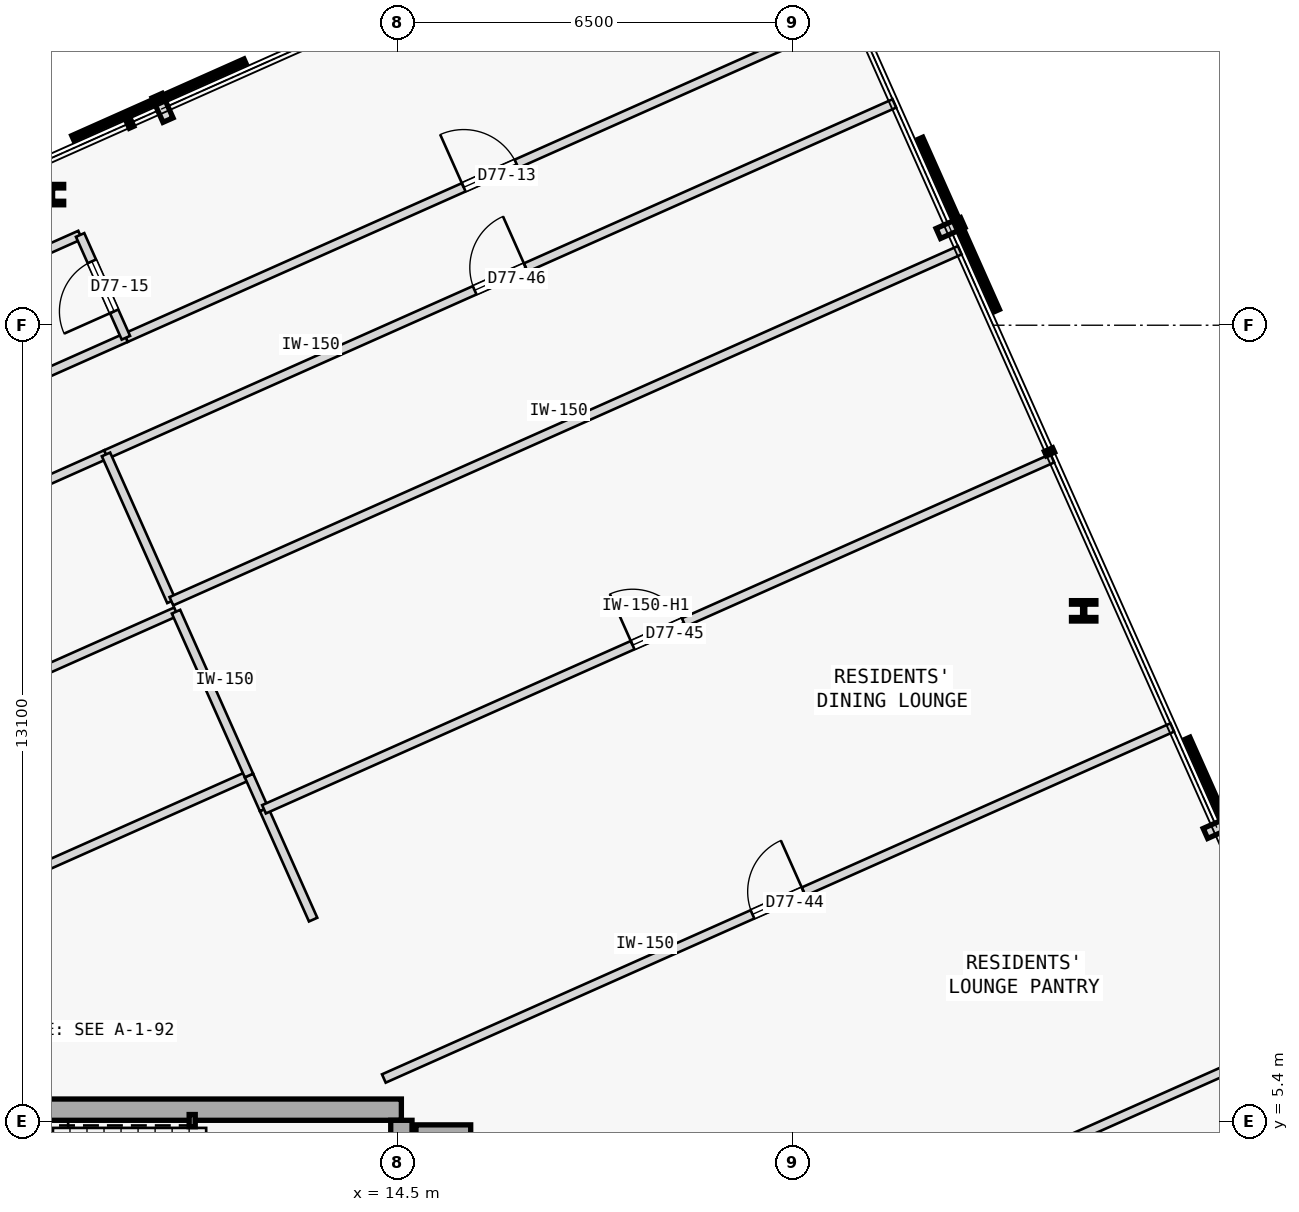
"""IFC4 building model, lengths in metres.
Left out: names, types, materials, properties, quantities, classifications, styles, units other than length and angle.
Written with IfcOpenShell. Run it as: python <this file> out.ifc"""

import sys

from ifc_helpers import new_model, si_unit, direction, frame, frame_2d, origin, origin_2d, place, context, subcontext, project, spatial, rectangle, hollow_rectangle, i_section, extrude, element, fill, save


model = new_model("IFC4")
c1 = context("Model", 3, precision=1e-05, world=origin(), true_north=direction((0.0, 1.0)))
c2 = subcontext(c1, "Body", "Model", "MODEL_VIEW")
j1 = project(units=[si_unit("LENGTHUNIT", "METRE"), si_unit("PLANEANGLEUNIT", "RADIAN")], contexts=[c1])
p1 = place(None, origin())
s1 = spatial("IfcSite", under=j1, at=p1, CompositionType="ELEMENT")
p2 = place(p1, origin())
s2 = spatial("IfcBuilding", under=s1, at=p2, CompositionType="ELEMENT")
p3 = place(p2, frame((0.0, 0.0, 288.6)))
s3 = spatial("IfcBuildingStorey", under=s2, at=p3, CompositionType="ELEMENT", Elevation=288.6)
p4 = place(p3, frame((15.25, 4.9, 0.0), z_axis=(0.0, 0.0, 1.0), x_axis=(1.0, 0.0, 0.0)))
e1 = element("IfcColumn", 1, at=p4, inside=s3, PredefinedType="COLUMN", context=c2, shape_type="SweptSolid", body=[
    extrude(rectangle(XDim=0.9, YDim=0.9, at=origin_2d()), origin(), (0.0, 0.0, 1.0), 3.35),
])
p5 = place(p3, frame((3.15, 5.6, 0.0), z_axis=(0.0, 0.0, 1.0), x_axis=(1.0, 0.0, 0.0)))
e2 = element("IfcWall", 2, at=p5, inside=s3, PredefinedType="SHEAR", context=c2, shape_type="SweptSolid", body=[
    extrude(rectangle(XDim=11.41, YDim=0.35, at=frame_2d((5.705, 0.0))), origin(), (0.0, 0.0, 1.0), 3.125),
])
p6 = place(p3, frame((14.56, -5.425, 0.0), z_axis=(0.0, 0.0, 1.0), x_axis=(0.0, 1.0, 0.0)))
e3 = element("IfcWall", 3, at=p6, inside=s3, PredefinedType="SHEAR", context=c2, shape_type="SweptSolid", body=[
    extrude(rectangle(XDim=10.85, YDim=0.35, at=frame_2d((5.425, 0.0))), origin(), (0.0, 0.0, 1.0), 3.125),
])
p7 = place(p3, frame((11.12, 5.42, 0.0), z_axis=(0.0, 0.0, 1.0), x_axis=(1.0, 0.0, 0.0)))
e4 = element("IfcColumn", 4, at=p7, inside=s3, PredefinedType="COLUMN", context=c2, shape_type="SweptSolid", body=[
    extrude(hollow_rectangle(XDim=0.1, YDim=0.2, WallThickness=0.008, at=origin_2d()), origin(), (0.0, 0.0, 1.0), 3.35),
])
for number, where, z_axis, x_axis in (
    (5, (25.781, 13.803, 0.0), (0.0, 0.0, 1.0), (1.0, 0.0, 0.0)),
    (6, (8.806, 20.648, 0.0), (0.0, 0.0, 1.0), (1.0, 0.0, 0.0)),
):
    element("IfcColumn", number, at=place(p3, frame(where, z_axis=z_axis, x_axis=x_axis)), inside=s3, PredefinedType="COLUMN", context=c2, shape_type="SweptSolid", body=[
        extrude(i_section(OverallWidth=0.401, OverallDepth=0.335, WebThickness=0.036, FlangeThickness=0.058, FilletRadius=0.015, at=origin_2d()), origin(), (0.0, 0.0, 1.0), 3.35),
    ])
p8 = place(p3, frame((10.03, 18.294, 0.0), z_axis=(0.0, 0.0, 1.0), x_axis=(0.913545706015, 0.406736085222, 0.0)))
e7 = element("IfcWall", 7, at=p8, inside=s3, PredefinedType="PARTITIONING", context=c2, shape_type="SweptSolid", body=[
    extrude(rectangle(XDim=13.113, YDim=0.15, at=frame_2d((6.557, 0.0))), origin(), (0.0, 0.0, 1.0), 3.125),
])
p9 = place(p8, frame((6.082, 0.0, 0.0)))
e8 = element("IfcOpeningElement", 8, at=p9, cuts=e7, PredefinedType="OPENING", context=c2, shape_type="SweptSolid", body=[
    extrude(rectangle(XDim=0.95, YDim=2.15, at=frame_2d((0.475, 1.075))), frame((0.0, 0.085, 0.0), z_axis=(0.0, -1.0, 0.0), x_axis=(1.0, 0.0, 0.0)), (0.0, 0.0, 1.0), 0.17),
])
p10 = place(p3, frame((6.055, 16.525, 0.0), z_axis=(0.0, 0.0, 1.0), x_axis=(0.913554477336, 0.406716383908, 0.0)))
e9 = element("IfcWall", 9, at=p10, inside=s3, PredefinedType="PARTITIONING", context=c2, shape_type="SweptSolid", body=[
    extrude(rectangle(XDim=4.35, YDim=0.15, at=frame_2d((2.175, 0.0))), origin(), (0.0, 0.0, 1.0), 3.125),
])
p11 = place(p3, frame((3.7, 13.703, 0.0), z_axis=(0.0, 0.0, 1.0), x_axis=(0.913549363376, 0.406727870542, 0.0)))
e10 = element("IfcWall", 10, at=p11, inside=s3, PredefinedType="PARTITIONING", context=c2, shape_type="SweptSolid", body=[
    extrude(rectangle(XDim=6.571, YDim=0.15, at=frame_2d((3.286, 0.0))), origin(), (0.0, 0.0, 1.0), 3.125),
])
p12 = place(p11, frame((2.825, 0.0, 0.0)))
e11 = element("IfcOpeningElement", 11, at=p12, cuts=e10, PredefinedType="OPENING", context=c2, shape_type="SweptSolid", body=[
    extrude(rectangle(XDim=0.92, YDim=2.15, at=frame_2d((0.46, 1.075))), frame((0.0, 0.085, 0.0), z_axis=(0.0, -1.0, 0.0), x_axis=(1.0, 0.0, 0.0)), (0.0, 0.0, 1.0), 0.17),
])
p13 = place(p3, frame((9.703, 16.375, 0.0), z_axis=(0.0, 0.0, 1.0), x_axis=(0.913544622417, 0.406738519018, 0.0)))
e12 = element("IfcWall", 12, at=p13, inside=s3, PredefinedType="PARTITIONING", context=c2, shape_type="SweptSolid", body=[
    extrude(rectangle(XDim=14.192, YDim=0.15, at=frame_2d((7.096, 0.0))), origin(), (0.0, 0.0, 1.0), 3.125),
])
p14 = place(p13, frame((6.636, 0.0, 0.0)))
e13 = element("IfcOpeningElement", 13, at=p14, cuts=e12, PredefinedType="OPENING", context=c2, shape_type="SweptSolid", body=[
    extrude(rectangle(XDim=0.92, YDim=2.15, at=frame_2d((0.46, 1.075))), frame((0.0, 0.085, 0.0), z_axis=(0.0, -1.0, 0.0), x_axis=(1.0, 0.0, 0.0)), (0.0, 0.0, 1.0), 0.17),
])
p15 = place(p3, frame((5.303, 18.215, 0.0), z_axis=(0.0, 0.0, 1.0), x_axis=(0.913554477336, 0.406716383908, 0.0)))
e14 = element("IfcWall", 14, at=p15, inside=s3, PredefinedType="PARTITIONING", context=c2, shape_type="SweptSolid", body=[
    extrude(rectangle(XDim=4.35, YDim=0.15, at=frame_2d((2.175, 0.0))), origin(), (0.0, 0.0, 1.0), 3.125),
])
p16 = place(p3, frame((10.03, 18.294, 0.0), z_axis=(0.0, 0.0, 1.0), x_axis=(-0.406701600856, 0.913561058639, 0.0)))
e15 = element("IfcWall", 15, at=p16, inside=s3, PredefinedType="PARTITIONING", context=c2, shape_type="SweptSolid", body=[
    extrude(rectangle(XDim=1.85, YDim=0.15, at=frame_2d((0.925, 0.0))), origin(), (0.0, 0.0, 1.0), 3.125),
])
p17 = place(p16, frame((0.475, 0.0, 0.0)))
e16 = element("IfcOpeningElement", 16, at=p17, cuts=e15, PredefinedType="OPENING", context=c2, shape_type="SweptSolid", body=[
    extrude(rectangle(XDim=0.9, YDim=2.15, at=frame_2d((0.45, 1.075))), frame((0.0, 0.085, 0.0), z_axis=(0.0, -1.0, 0.0), x_axis=(1.0, 0.0, 0.0)), (0.0, 0.0, 1.0), 0.17),
])
p18 = place(p3, frame((3.7, 7.376, 0.0), z_axis=(0.0, 0.0, 1.0), x_axis=(0.91354490899, 0.406737875367, 0.0)))
e17 = element("IfcWall", 17, at=p18, inside=s3, PredefinedType="PARTITIONING", context=c2, shape_type="SweptSolid", body=[
    extrude(rectangle(XDim=9.144, YDim=0.15, at=frame_2d((4.572, 0.0))), origin(), (0.0, 0.0, 1.0), 3.125),
])
p19 = place(p3, frame((13.109, 8.726, 0.0), z_axis=(0.0, 0.0, 1.0), x_axis=(-0.406788519224, 0.913522359128, 0.0)))
e18 = element("IfcWall", 18, at=p19, inside=s3, PredefinedType="PARTITIONING", context=c2, shape_type="SweptSolid", body=[
    extrude(rectangle(XDim=1.986, YDim=0.15, at=frame_2d((0.993, 0.0))), origin(), (0.0, 0.0, 1.0), 3.125),
])
p20 = place(p3, frame((12.301, 10.54, 0.0), z_axis=(0.0, 0.0, 1.0), x_axis=(-0.406436552015, 0.913679007741, 0.0)))
e19 = element("IfcWall", 19, at=p20, inside=s3, PredefinedType="PARTITIONING", context=c2, shape_type="SweptSolid", body=[
    extrude(rectangle(XDim=0.608, YDim=0.15, at=frame_2d((0.304, 0.0))), origin(), (0.0, 0.0, 1.0), 3.125),
])
p21 = place(p3, frame((3.7, 10.604, 0.0), z_axis=(0.0, 0.0, 1.0), x_axis=(0.913534926439, 0.406760295722, 0.0)))
e20 = element("IfcWall", 20, at=p21, inside=s3, PredefinedType="PARTITIONING", context=c2, shape_type="SweptSolid", body=[
    extrude(rectangle(XDim=7.831, YDim=0.15, at=frame_2d((3.916, 0.0))), origin(), (0.0, 0.0, 1.0), 3.125),
])
p22 = place(p3, frame((12.054, 11.095, 0.0), z_axis=(0.0, 0.0, 1.0), x_axis=(-0.406798922371, 0.91351772657, 0.0)))
e21 = element("IfcWall", 21, at=p22, inside=s3, PredefinedType="PARTITIONING", context=c2, shape_type="SweptSolid", body=[
    extrude(rectangle(XDim=2.949, YDim=0.15, at=frame_2d((1.475, 0.0))), origin(), (0.0, 0.0, 1.0), 3.125),
])
p23 = place(p3, frame((10.778, 13.961, 0.0), z_axis=(0.0, 0.0, 1.0), x_axis=(-0.406712614091, 0.913556155657, 0.0)))
e22 = element("IfcWall", 22, at=p23, inside=s3, PredefinedType="PARTITIONING", context=c2, shape_type="SweptSolid", body=[
    extrude(rectangle(XDim=2.643, YDim=0.15, at=frame_2d((1.322, 0.0))), origin(), (0.0, 0.0, 1.0), 3.125),
])
p24 = place(p3, frame((16.512, 1.082, 0.0), z_axis=(0.0, 0.0, 1.0), x_axis=(0.913544622417, 0.406738519018, 0.0)))
e23 = element("IfcWall", 23, at=p24, inside=s3, PredefinedType="PARTITIONING", context=c2, shape_type="SweptSolid", body=[
    extrude(rectangle(XDim=14.192, YDim=0.15, at=frame_2d((7.096, 0.0))), origin(), (0.0, 0.0, 1.0), 3.125),
])
p25 = place(p24, frame((6.636, 0.0, 0.0)))
e24 = element("IfcOpeningElement", 24, at=p25, cuts=e23, PredefinedType="OPENING", context=c2, shape_type="SweptSolid", body=[
    extrude(rectangle(XDim=0.92, YDim=2.15, at=frame_2d((0.46, 1.075))), frame((0.0, 0.085, 0.0), z_axis=(0.0, -1.0, 0.0), x_axis=(1.0, 0.0, 0.0)), (0.0, 0.0, 1.0), 0.17),
])
p26 = place(p3, frame((14.272, 6.113, 0.0), z_axis=(0.0, 0.0, 1.0), x_axis=(0.913551014388, 0.406724162191, 0.0)))
e25 = element("IfcWall", 25, at=p26, inside=s3, PredefinedType="PARTITIONING", context=c2, shape_type="SweptSolid", body=[
    extrude(rectangle(XDim=14.192, YDim=0.15, at=frame_2d((7.096, 0.0))), origin(), (0.0, 0.0, 1.0), 3.125),
])
p27 = place(p26, frame((6.636, 0.0, 0.0)))
e26 = element("IfcOpeningElement", 26, at=p27, cuts=e25, PredefinedType="OPENING", context=c2, shape_type="SweptSolid", body=[
    extrude(rectangle(XDim=0.92, YDim=2.15, at=frame_2d((0.46, 1.075))), frame((0.0, 0.085, 0.0), z_axis=(0.0, -1.0, 0.0), x_axis=(1.0, 0.0, 0.0)), (0.0, 0.0, 1.0), 0.17),
])
p28 = place(p3, frame((12.301, 10.54, 0.0), z_axis=(0.0, 0.0, 1.0), x_axis=(0.913544622417, 0.406738519018, 0.0)))
e27 = element("IfcWall", 27, at=p28, inside=s3, PredefinedType="PARTITIONING", context=c2, shape_type="SweptSolid", body=[
    extrude(rectangle(XDim=14.192, YDim=0.15, at=frame_2d((7.096, 0.0))), origin(), (0.0, 0.0, 1.0), 2.675),
])
p29 = place(p28, frame((6.636, 0.0, 0.0)))
e28 = element("IfcOpeningElement", 28, at=p29, cuts=e27, PredefinedType="OPENING", context=c2, shape_type="SweptSolid", body=[
    extrude(rectangle(XDim=0.92, YDim=2.15, at=frame_2d((0.46, 1.075))), frame((0.0, 0.085, 0.0), z_axis=(0.0, -1.0, 0.0), x_axis=(1.0, 0.0, 0.0)), (0.0, 0.0, 1.0), 0.17),
])
p30 = place(p3, frame((10.778, 13.961, 0.0), z_axis=(0.0, 0.0, 1.0), x_axis=(0.913544622417, 0.406738519018, 0.0)))
e29 = element("IfcWall", 29, at=p30, inside=s3, PredefinedType="PARTITIONING", context=c2, shape_type="SweptSolid", body=[
    extrude(rectangle(XDim=14.192, YDim=0.15, at=frame_2d((7.096, 0.0))), origin(), (0.0, 0.0, 1.0), 3.125),
])
p31 = place(p9, origin())
e30 = element("IfcDoor", 30, at=p31, inside=s3, OperationType="SINGLE_SWING_LEFT", PredefinedType="DOOR", context=c2, shape_type="SweptSolid", body=[
    extrude(rectangle(XDim=0.95, YDim=2.15, at=frame_2d((0.475, 1.075))), frame((0.0, 0.025, 0.0), z_axis=(0.0, -1.0, 0.0), x_axis=(1.0, 0.0, 0.0)), (0.0, 0.0, 1.0), 0.05),
])
fill(e8, e30)
p32 = place(p17, origin())
e31 = element("IfcDoor", 31, at=p32, inside=s3, OperationType="SINGLE_SWING_LEFT", PredefinedType="DOOR", context=c2, shape_type="SweptSolid", body=[
    extrude(rectangle(XDim=0.9, YDim=2.15, at=frame_2d((0.45, 1.075))), frame((0.0, 0.025, 0.0), z_axis=(0.0, -1.0, 0.0), x_axis=(1.0, 0.0, 0.0)), (0.0, 0.0, 1.0), 0.05),
])
fill(e16, e31)
p33 = place(p27, origin())
e32 = element("IfcDoor", 32, at=p33, inside=s3, OperationType="SINGLE_SWING_RIGHT", PredefinedType="DOOR", context=c2, shape_type="SweptSolid", body=[
    extrude(rectangle(XDim=0.92, YDim=2.15, at=frame_2d((0.46, 1.075))), frame((0.0, 0.025, 0.0), z_axis=(0.0, -1.0, 0.0), x_axis=(1.0, 0.0, 0.0)), (0.0, 0.0, 1.0), 0.05),
])
fill(e26, e32)
p34 = place(p29, origin())
e33 = element("IfcDoor", 33, at=p34, inside=s3, OperationType="SINGLE_SWING_LEFT", PredefinedType="DOOR", context=c2, shape_type="SweptSolid", body=[
    extrude(rectangle(XDim=0.92, YDim=2.15, at=frame_2d((0.46, 1.075))), frame((0.0, 0.025, 0.0), z_axis=(0.0, -1.0, 0.0), x_axis=(1.0, 0.0, 0.0)), (0.0, 0.0, 1.0), 0.05),
])
fill(e28, e33)
p35 = place(p14, origin())
e34 = element("IfcDoor", 34, at=p35, inside=s3, OperationType="SINGLE_SWING_RIGHT", PredefinedType="DOOR", context=c2, shape_type="SweptSolid", body=[
    extrude(rectangle(XDim=0.92, YDim=2.15, at=frame_2d((0.46, 1.075))), frame((0.0, 0.025, 0.0), z_axis=(0.0, -1.0, 0.0), x_axis=(1.0, 0.0, 0.0)), (0.0, 0.0, 1.0), 0.05),
])
fill(e13, e34)
save(model, sys.argv[1])
